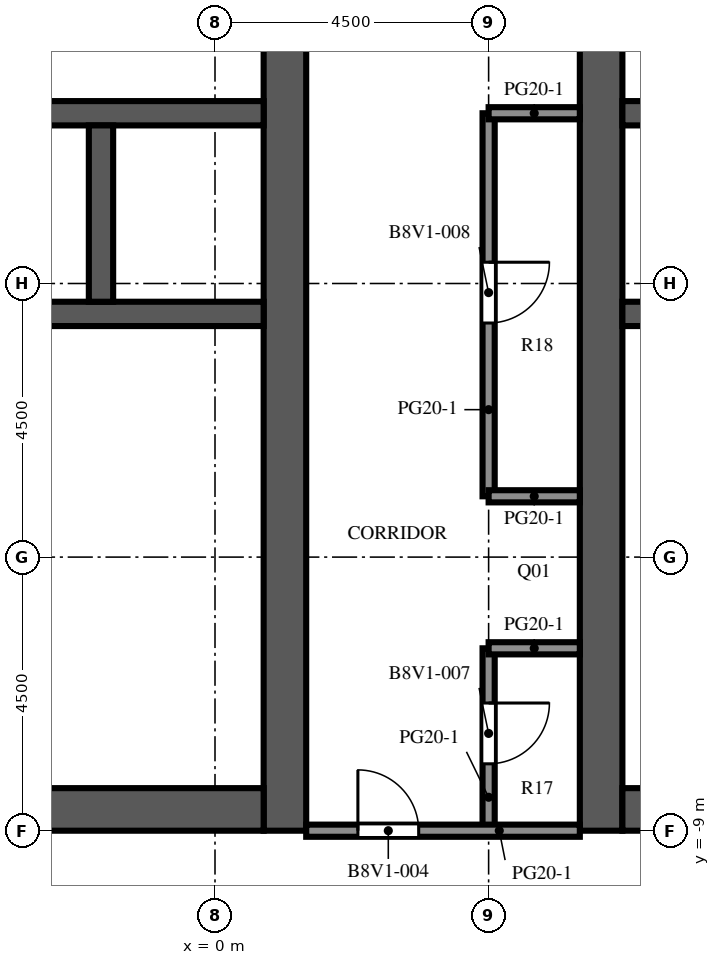
"""IFC4 building model, lengths in metres.
Left out: names, types, materials, properties, quantities, classifications, styles, units other than length and angle.
Written with IfcOpenShell. Run it as: python <this file> out.ifc"""

import sys

from ifc_helpers import new_model, si_unit, direction, frame, frame_2d, origin, place, context, subcontext, project, spatial, rectangle, extrude, element, fill, save


model = new_model("IFC4")
c1 = context("Model", 3, precision=1e-05, world=origin(), true_north=direction((0.0, 1.0)))
c2 = subcontext(c1, "Body", "Model", "MODEL_VIEW")
j1 = project(units=[si_unit("LENGTHUNIT", "METRE"), si_unit("PLANEANGLEUNIT", "RADIAN")], contexts=[c1])
p1 = place(None, origin())
s1 = spatial("IfcSite", under=j1, at=p1, CompositionType="ELEMENT")
p2 = place(p1, origin())
s2 = spatial("IfcBuilding", under=s1, at=p2, CompositionType="ELEMENT")
p3 = place(p2, frame((0.0, 0.0, 270.4)))
s3 = spatial("IfcBuildingStorey", under=s2, at=p3, CompositionType="ELEMENT", Elevation=270.4)
p4 = place(p3, frame((1.15, -9.0, 0.0), z_axis=(0.0, 0.0, 1.0), x_axis=(0.0, 1.0, 0.0)))
e1 = element("IfcWall", 1, at=p4, inside=s3, PredefinedType="SHEAR", context=c2, shape_type="SweptSolid", body=[
    extrude(rectangle(XDim=27.5, YDim=0.7, at=frame_2d((13.75, 0.0))), origin(), (0.0, 0.0, 1.0), 4.1),
])
p5 = place(p4, frame((12.55, 0.0, 0.0)))
e2 = element("IfcOpeningElement", 2, at=p5, cuts=e1, PredefinedType="OPENING", context=c2, shape_type="SweptSolid", body=[
    extrude(rectangle(XDim=2.4, YDim=2.4, at=frame_2d((1.2, 1.2))), frame((0.0, 0.36, 0.0), z_axis=(0.0, -1.0, 0.0), x_axis=(1.0, 0.0, 0.0)), (0.0, 0.0, 1.0), 0.72),
])
p6 = place(p4, frame((3.9, 0.0, 0.0)))
e3 = element("IfcOpeningElement", 3, at=p6, cuts=e1, PredefinedType="OPENING", context=c2, shape_type="SweptSolid", body=[
    extrude(rectangle(XDim=1.2, YDim=2.1, at=frame_2d((0.6, 1.05))), frame((0.0, 0.36, 0.0), z_axis=(0.0, -1.0, 0.0), x_axis=(1.0, 0.0, 0.0)), (0.0, 0.0, 1.0), 0.72),
])
p7 = place(p4, frame((19.46, 0.0, 0.0)))
e4 = element("IfcOpeningElement", 4, at=p7, cuts=e1, PredefinedType="OPENING", context=c2, shape_type="SweptSolid", body=[
    extrude(rectangle(XDim=1.0, YDim=2.1, at=frame_2d((0.5, 1.05))), frame((0.0, 0.36, 0.0), z_axis=(0.0, -1.0, 0.0), x_axis=(1.0, 0.0, 0.0)), (0.0, 0.0, 1.0), 0.72),
])
p8 = place(p4, frame((21.17, 0.0, 0.0)))
e5 = element("IfcOpeningElement", 5, at=p8, cuts=e1, PredefinedType="OPENING", context=c2, shape_type="SweptSolid", body=[
    extrude(rectangle(XDim=1.0, YDim=2.1, at=frame_2d((0.5, 1.05))), frame((0.0, 0.36, 0.0), z_axis=(0.0, -1.0, 0.0), x_axis=(1.0, 0.0, 0.0)), (0.0, 0.0, 1.0), 0.72),
])
p9 = place(p4, frame((23.26, 0.0, 0.0)))
e6 = element("IfcOpeningElement", 6, at=p9, cuts=e1, PredefinedType="OPENING", context=c2, shape_type="SweptSolid", body=[
    extrude(rectangle(XDim=1.0, YDim=2.1, at=frame_2d((0.5, 1.05))), frame((0.0, 0.36, 0.0), z_axis=(0.0, -1.0, 0.0), x_axis=(1.0, 0.0, 0.0)), (0.0, 0.0, 1.0), 0.72),
])
p10 = place(p4, frame((25.35, 0.0, 0.0)))
e7 = element("IfcOpeningElement", 7, at=p10, cuts=e1, PredefinedType="OPENING", context=c2, shape_type="SweptSolid", body=[
    extrude(rectangle(XDim=1.0, YDim=2.1, at=frame_2d((0.5, 1.05))), frame((0.0, 0.36, 0.0), z_axis=(0.0, -1.0, 0.0), x_axis=(1.0, 0.0, 0.0)), (0.0, 0.0, 1.0), 0.72),
])
p11 = place(p3, frame((-9.8, -8.65, 0.0), z_axis=(0.0, 0.0, 1.0), x_axis=(1.0, 0.0, 0.0)))
e8 = element("IfcWall", 8, at=p11, inside=s3, PredefinedType="SHEAR", context=c2, shape_type="SweptSolid", body=[
    extrude(rectangle(XDim=10.6, YDim=0.7, at=frame_2d((5.3, 0.0))), origin(), (0.0, 0.0, 1.0), 4.1),
])
p12 = place(p3, frame((-9.8, -0.5, 0.0), z_axis=(0.0, 0.0, 1.0), x_axis=(1.0, 0.0, 0.0)))
e9 = element("IfcWall", 9, at=p12, inside=s3, PredefinedType="SHEAR", context=c2, shape_type="SweptSolid", body=[
    extrude(rectangle(XDim=10.6, YDim=0.4, at=frame_2d((5.3, 0.0))), origin(), (0.0, 0.0, 1.0), 4.1),
])
p13 = place(p3, frame((-9.8, 2.8, 0.0), z_axis=(0.0, 0.0, 1.0), x_axis=(1.0, 0.0, 0.0)))
e10 = element("IfcWall", 10, at=p13, inside=s3, PredefinedType="SHEAR", context=c2, shape_type="SweptSolid", body=[
    extrude(rectangle(XDim=10.6, YDim=0.4, at=frame_2d((5.3, 0.0))), origin(), (0.0, 0.0, 1.0), 4.1),
])
p14 = place(p13, frame((0.688, 0.0, 0.0)))
e11 = element("IfcOpeningElement", 11, at=p14, cuts=e10, PredefinedType="OPENING", context=c2, shape_type="SweptSolid", body=[
    extrude(rectangle(XDim=1.1, YDim=2.1, at=frame_2d((0.55, 1.05))), frame((0.0, 0.21, 0.0), z_axis=(0.0, -1.0, 0.0), x_axis=(1.0, 0.0, 0.0)), (0.0, 0.0, 1.0), 0.42),
])
p15 = place(p13, frame((3.438, 0.0, 0.0)))
e12 = element("IfcOpeningElement", 12, at=p15, cuts=e10, PredefinedType="OPENING", context=c2, shape_type="SweptSolid", body=[
    extrude(rectangle(XDim=1.1, YDim=2.1, at=frame_2d((0.55, 1.05))), frame((0.0, 0.21, 0.0), z_axis=(0.0, -1.0, 0.0), x_axis=(1.0, 0.0, 0.0)), (0.0, 0.0, 1.0), 0.42),
])
p16 = place(p13, frame((6.113, 0.0, 0.0)))
e13 = element("IfcOpeningElement", 13, at=p16, cuts=e10, PredefinedType="OPENING", context=c2, shape_type="SweptSolid", body=[
    extrude(rectangle(XDim=1.0, YDim=2.1, at=frame_2d((0.5, 1.05))), frame((0.0, 0.21, 0.0), z_axis=(0.0, -1.0, 0.0), x_axis=(1.0, 0.0, 0.0)), (0.0, 0.0, 1.0), 0.42),
])
p17 = place(p13, frame((8.863, 0.0, 0.0)))
e14 = element("IfcOpeningElement", 14, at=p17, cuts=e10, PredefinedType="OPENING", context=c2, shape_type="SweptSolid", body=[
    extrude(rectangle(XDim=1.0, YDim=2.1, at=frame_2d((0.5, 1.05))), frame((0.0, 0.21, 0.0), z_axis=(0.0, -1.0, 0.0), x_axis=(1.0, 0.0, 0.0)), (0.0, 0.0, 1.0), 0.42),
])
p18 = place(p3, frame((-1.875, -0.3, 0.0), z_axis=(0.0, 0.0, 1.0), x_axis=(0.0, 1.0, 0.0)))
e15 = element("IfcWall", 15, at=p18, inside=s3, PredefinedType="SHEAR", context=c2, shape_type="SweptSolid", body=[
    extrude(rectangle(XDim=2.9, YDim=0.4, at=frame_2d((1.45, 0.0))), origin(), (0.0, 0.0, 1.0), 4.1),
])
p19 = place(p3, frame((6.35, -9.0, 0.0), z_axis=(0.0, 0.0, 1.0), x_axis=(0.0, 1.0, 0.0)))
e16 = element("IfcWall", 16, at=p19, inside=s3, PredefinedType="SHEAR", context=c2, shape_type="SweptSolid", body=[
    extrude(rectangle(XDim=27.5, YDim=0.7, at=frame_2d((13.75, 0.0))), origin(), (0.0, 0.0, 1.0), 4.1),
])
p20 = place(p19, frame((12.55, 0.0, 0.0)))
e17 = element("IfcOpeningElement", 17, at=p20, cuts=e16, PredefinedType="OPENING", context=c2, shape_type="SweptSolid", body=[
    extrude(rectangle(XDim=2.4, YDim=2.4, at=frame_2d((1.2, 1.2))), frame((0.0, 0.36, 0.0), z_axis=(0.0, -1.0, 0.0), x_axis=(1.0, 0.0, 0.0)), (0.0, 0.0, 1.0), 0.72),
])
p21 = place(p19, frame((3.9, 0.0, 0.0)))
e18 = element("IfcOpeningElement", 18, at=p21, cuts=e16, PredefinedType="OPENING", context=c2, shape_type="SweptSolid", body=[
    extrude(rectangle(XDim=1.2, YDim=2.1, at=frame_2d((0.6, 1.05))), frame((0.0, 0.36, 0.0), z_axis=(0.0, -1.0, 0.0), x_axis=(1.0, 0.0, 0.0)), (0.0, 0.0, 1.0), 0.72),
])
p22 = place(p19, frame((19.46, 0.0, 0.0)))
e19 = element("IfcOpeningElement", 19, at=p22, cuts=e16, PredefinedType="OPENING", context=c2, shape_type="SweptSolid", body=[
    extrude(rectangle(XDim=1.0, YDim=2.1, at=frame_2d((0.5, 1.05))), frame((0.0, 0.36, 0.0), z_axis=(0.0, -1.0, 0.0), x_axis=(1.0, 0.0, 0.0)), (0.0, 0.0, 1.0), 0.72),
])
p23 = place(p19, frame((21.17, 0.0, 0.0)))
e20 = element("IfcOpeningElement", 20, at=p23, cuts=e16, PredefinedType="OPENING", context=c2, shape_type="SweptSolid", body=[
    extrude(rectangle(XDim=1.0, YDim=2.1, at=frame_2d((0.5, 1.05))), frame((0.0, 0.36, 0.0), z_axis=(0.0, -1.0, 0.0), x_axis=(1.0, 0.0, 0.0)), (0.0, 0.0, 1.0), 0.72),
])
p24 = place(p19, frame((23.26, 0.0, 0.0)))
e21 = element("IfcOpeningElement", 21, at=p24, cuts=e16, PredefinedType="OPENING", context=c2, shape_type="SweptSolid", body=[
    extrude(rectangle(XDim=1.0, YDim=2.1, at=frame_2d((0.5, 1.05))), frame((0.0, 0.36, 0.0), z_axis=(0.0, -1.0, 0.0), x_axis=(1.0, 0.0, 0.0)), (0.0, 0.0, 1.0), 0.72),
])
p25 = place(p19, frame((25.35, 0.0, 0.0)))
e22 = element("IfcOpeningElement", 22, at=p25, cuts=e16, PredefinedType="OPENING", context=c2, shape_type="SweptSolid", body=[
    extrude(rectangle(XDim=1.0, YDim=2.1, at=frame_2d((0.5, 1.05))), frame((0.0, 0.36, 0.0), z_axis=(0.0, -1.0, 0.0), x_axis=(1.0, 0.0, 0.0)), (0.0, 0.0, 1.0), 0.72),
])
p26 = place(p3, frame((6.7, -8.65, 0.0), z_axis=(0.0, 0.0, 1.0), x_axis=(1.0, 0.0, 0.0)))
e23 = element("IfcWall", 23, at=p26, inside=s3, PredefinedType="SHEAR", context=c2, shape_type="SweptSolid", body=[
    extrude(rectangle(XDim=10.6, YDim=0.7, at=frame_2d((5.3, 0.0))), origin(), (0.0, 0.0, 1.0), 4.1),
])
p27 = place(p3, frame((6.7, -0.5, 0.0), z_axis=(0.0, 0.0, 1.0), x_axis=(1.0, 0.0, 0.0)))
e24 = element("IfcWall", 24, at=p27, inside=s3, PredefinedType="SHEAR", context=c2, shape_type="SweptSolid", body=[
    extrude(rectangle(XDim=10.6, YDim=0.4, at=frame_2d((5.3, 0.0))), origin(), (0.0, 0.0, 1.0), 4.1),
])
p28 = place(p3, frame((6.7, 2.8, 0.0), z_axis=(0.0, 0.0, 1.0), x_axis=(1.0, 0.0, 0.0)))
e25 = element("IfcWall", 25, at=p28, inside=s3, PredefinedType="SHEAR", context=c2, shape_type="SweptSolid", body=[
    extrude(rectangle(XDim=10.6, YDim=0.4, at=frame_2d((5.3, 0.0))), origin(), (0.0, 0.0, 1.0), 4.1),
])
p29 = place(p28, frame((0.688, 0.0, 0.0)))
e26 = element("IfcOpeningElement", 26, at=p29, cuts=e25, PredefinedType="OPENING", context=c2, shape_type="SweptSolid", body=[
    extrude(rectangle(XDim=1.1, YDim=2.1, at=frame_2d((0.55, 1.05))), frame((0.0, 0.21, 0.0), z_axis=(0.0, -1.0, 0.0), x_axis=(1.0, 0.0, 0.0)), (0.0, 0.0, 1.0), 0.42),
])
p30 = place(p28, frame((3.438, 0.0, 0.0)))
e27 = element("IfcOpeningElement", 27, at=p30, cuts=e25, PredefinedType="OPENING", context=c2, shape_type="SweptSolid", body=[
    extrude(rectangle(XDim=1.1, YDim=2.1, at=frame_2d((0.55, 1.05))), frame((0.0, 0.21, 0.0), z_axis=(0.0, -1.0, 0.0), x_axis=(1.0, 0.0, 0.0)), (0.0, 0.0, 1.0), 0.42),
])
p31 = place(p28, frame((6.113, 0.0, 0.0)))
e28 = element("IfcOpeningElement", 28, at=p31, cuts=e25, PredefinedType="OPENING", context=c2, shape_type="SweptSolid", body=[
    extrude(rectangle(XDim=1.0, YDim=2.1, at=frame_2d((0.5, 1.05))), frame((0.0, 0.21, 0.0), z_axis=(0.0, -1.0, 0.0), x_axis=(1.0, 0.0, 0.0)), (0.0, 0.0, 1.0), 0.42),
])
p32 = place(p28, frame((8.863, 0.0, 0.0)))
e29 = element("IfcOpeningElement", 29, at=p32, cuts=e25, PredefinedType="OPENING", context=c2, shape_type="SweptSolid", body=[
    extrude(rectangle(XDim=1.0, YDim=2.1, at=frame_2d((0.5, 1.05))), frame((0.0, 0.21, 0.0), z_axis=(0.0, -1.0, 0.0), x_axis=(1.0, 0.0, 0.0)), (0.0, 0.0, 1.0), 0.42),
])
p33 = place(p3, frame((-0.8, -6.02, 0.0), z_axis=(0.0, 0.0, 1.0), x_axis=(1.0, 0.0, 0.0)))
e30 = element("IfcWall", 30, at=p33, inside=s3, PredefinedType="PARTITIONING", context=c2, shape_type="SweptSolid", body=[
    extrude(rectangle(XDim=1.6, YDim=0.1, at=frame_2d((0.8, 0.0))), origin(), (0.0, 0.0, 1.0), 3.65),
])
p34 = place(p33, frame((0.3, 0.0, 0.0)))
e31 = element("IfcOpeningElement", 31, at=p34, cuts=e30, PredefinedType="OPENING", context=c2, shape_type="SweptSolid", body=[
    extrude(rectangle(XDim=1.0, YDim=2.1, at=frame_2d((0.5, 1.05))), frame((0.0, 0.06, 0.0), z_axis=(0.0, -1.0, 0.0), x_axis=(1.0, 0.0, 0.0)), (0.0, 0.0, 1.0), 0.12),
])
p35 = place(p3, frame((-0.8, -2.98, 0.0), z_axis=(0.0, 0.0, 1.0), x_axis=(1.0, 0.0, 0.0)))
e32 = element("IfcWall", 32, at=p35, inside=s3, PredefinedType="PARTITIONING", context=c2, shape_type="SweptSolid", body=[
    extrude(rectangle(XDim=1.6, YDim=0.1, at=frame_2d((0.8, 0.0))), origin(), (0.0, 0.0, 1.0), 3.65),
])
p36 = place(p35, frame((0.3, 0.0, 0.0)))
e33 = element("IfcOpeningElement", 33, at=p36, cuts=e32, PredefinedType="OPENING", context=c2, shape_type="SweptSolid", body=[
    extrude(rectangle(XDim=1.0, YDim=2.1, at=frame_2d((0.5, 1.05))), frame((0.0, 0.06, 0.0), z_axis=(0.0, -1.0, 0.0), x_axis=(1.0, 0.0, 0.0)), (0.0, 0.0, 1.0), 0.12),
])
p37 = place(p3, frame((-0.8, -6.02, 0.0), z_axis=(0.0, 0.0, 1.0), x_axis=(0.0, 1.0, 0.0)))
e34 = element("IfcWall", 34, at=p37, inside=s3, PredefinedType="PARTITIONING", context=c2, shape_type="SweptSolid", body=[
    extrude(rectangle(XDim=3.04, YDim=0.1, at=frame_2d((1.52, 0.0))), origin(), (0.0, 0.0, 1.0), 3.65),
])
p38 = place(p37, frame((1.02, 0.0, 0.0)))
e35 = element("IfcOpeningElement", 35, at=p38, cuts=e34, PredefinedType="OPENING", context=c2, shape_type="SweptSolid", body=[
    extrude(rectangle(XDim=1.0, YDim=2.1, at=frame_2d((0.5, 1.05))), frame((0.0, 0.06, 0.0), z_axis=(0.0, -1.0, 0.0), x_axis=(1.0, 0.0, 0.0)), (0.0, 0.0, 1.0), 0.12),
])
for number, where, z_axis, x_axis in (
    (36, (-4.3, -6.02, 0.0), (0.0, 0.0, 1.0), (1.0, 0.0, 0.0)),
    (37, (-4.3, -2.98, 0.0), (0.0, 0.0, 1.0), (1.0, 0.0, 0.0)),
):
    element("IfcWall", number, at=place(p3, frame(where, z_axis=z_axis, x_axis=x_axis)), inside=s3, PredefinedType="PARTITIONING", context=c2, shape_type="SweptSolid", body=[
        extrude(rectangle(XDim=3.5, YDim=0.1, at=frame_2d((1.75, 0.0))), origin(), (0.0, 0.0, 1.0), 3.65),
    ])
p39 = place(p3, frame((6.7, -6.02, 0.0), z_axis=(0.0, 0.0, 1.0), x_axis=(1.0, 0.0, 0.0)))
e38 = element("IfcWall", 38, at=p39, inside=s3, PredefinedType="PARTITIONING", context=c2, shape_type="SweptSolid", body=[
    extrude(rectangle(XDim=1.6, YDim=0.1, at=frame_2d((0.8, 0.0))), origin(), (0.0, 0.0, 1.0), 3.65),
])
p40 = place(p39, frame((0.3, 0.0, 0.0)))
e39 = element("IfcOpeningElement", 39, at=p40, cuts=e38, PredefinedType="OPENING", context=c2, shape_type="SweptSolid", body=[
    extrude(rectangle(XDim=1.0, YDim=2.1, at=frame_2d((0.5, 1.05))), frame((0.0, 0.06, 0.0), z_axis=(0.0, -1.0, 0.0), x_axis=(1.0, 0.0, 0.0)), (0.0, 0.0, 1.0), 0.12),
])
p41 = place(p3, frame((6.7, -2.98, 0.0), z_axis=(0.0, 0.0, 1.0), x_axis=(1.0, 0.0, 0.0)))
e40 = element("IfcWall", 40, at=p41, inside=s3, PredefinedType="PARTITIONING", context=c2, shape_type="SweptSolid", body=[
    extrude(rectangle(XDim=1.6, YDim=0.1, at=frame_2d((0.8, 0.0))), origin(), (0.0, 0.0, 1.0), 3.65),
])
p42 = place(p41, frame((0.3, 0.0, 0.0)))
e41 = element("IfcOpeningElement", 41, at=p42, cuts=e40, PredefinedType="OPENING", context=c2, shape_type="SweptSolid", body=[
    extrude(rectangle(XDim=1.0, YDim=2.1, at=frame_2d((0.5, 1.05))), frame((0.0, 0.06, 0.0), z_axis=(0.0, -1.0, 0.0), x_axis=(1.0, 0.0, 0.0)), (0.0, 0.0, 1.0), 0.12),
])
p43 = place(p3, frame((4.5, -6.0, 0.0), z_axis=(0.0, 0.0, 1.0), x_axis=(0.0, -1.0, 0.0)))
e42 = element("IfcWall", 42, at=p43, inside=s3, PredefinedType="PARTITIONING", context=c2, shape_type="SweptSolid", body=[
    extrude(rectangle(XDim=3.0, YDim=0.2, at=frame_2d((1.5, 0.0))), origin(), (0.0, 0.0, 1.0), 3.65),
])
p44 = place(p43, frame((0.9, 0.0, 0.0)))
e43 = element("IfcOpeningElement", 43, at=p44, cuts=e42, PredefinedType="OPENING", context=c2, shape_type="SweptSolid", body=[
    extrude(rectangle(XDim=1.0, YDim=2.1, at=frame_2d((0.5, 1.05))), frame((0.0, 0.11, 0.0), z_axis=(0.0, -1.0, 0.0), x_axis=(1.0, 0.0, 0.0)), (0.0, 0.0, 1.0), 0.22),
])
p45 = place(p3, frame((4.5, 2.8, 0.0), z_axis=(0.0, 0.0, 1.0), x_axis=(0.0, -1.0, 0.0)))
e44 = element("IfcWall", 44, at=p45, inside=s3, PredefinedType="PARTITIONING", context=c2, shape_type="SweptSolid", body=[
    extrude(rectangle(XDim=6.3, YDim=0.2, at=frame_2d((3.15, 0.0))), origin(), (0.0, 0.0, 1.0), 3.65),
])
p46 = place(p45, frame((2.45, 0.0, 0.0)))
e45 = element("IfcOpeningElement", 45, at=p46, cuts=e44, PredefinedType="OPENING", context=c2, shape_type="SweptSolid", body=[
    extrude(rectangle(XDim=1.0, YDim=2.1, at=frame_2d((0.5, 1.05))), frame((0.0, 0.11, 0.0), z_axis=(0.0, -1.0, 0.0), x_axis=(1.0, 0.0, 0.0)), (0.0, 0.0, 1.0), 0.22),
])
p47 = place(p3, frame((6.0, -9.0, 0.0), z_axis=(0.0, 0.0, 1.0), x_axis=(-1.0, 0.0, 0.0)))
e46 = element("IfcWall", 46, at=p47, inside=s3, PredefinedType="PARTITIONING", context=c2, shape_type="SweptSolid", body=[
    extrude(rectangle(XDim=4.5, YDim=0.2, at=frame_2d((2.25, 0.0))), origin(), (0.0, 0.0, 1.0), 3.65),
])
p48 = place(p47, frame((2.65, 0.0, 0.0)))
e47 = element("IfcOpeningElement", 47, at=p48, cuts=e46, PredefinedType="OPENING", context=c2, shape_type="SweptSolid", body=[
    extrude(rectangle(XDim=1.0, YDim=2.1, at=frame_2d((0.5, 1.05))), frame((0.0, 0.11, 0.0), z_axis=(0.0, -1.0, 0.0), x_axis=(1.0, 0.0, 0.0)), (0.0, 0.0, 1.0), 0.22),
])
for number, where, z_axis, x_axis in (
    (48, (4.5, -6.0, 0.0), (0.0, 0.0, 1.0), (1.0, 0.0, 0.0)),
    (49, (4.5, -3.5, 0.0), (0.0, 0.0, 1.0), (1.0, 0.0, 0.0)),
    (50, (4.5, 2.8, 0.0), (0.0, 0.0, 1.0), (1.0, 0.0, 0.0)),
):
    element("IfcWall", number, at=place(p3, frame(where, z_axis=z_axis, x_axis=x_axis)), inside=s3, PredefinedType="PARTITIONING", context=c2, shape_type="SweptSolid", body=[
        extrude(rectangle(XDim=1.5, YDim=0.2, at=frame_2d((0.75, 0.0))), origin(), (0.0, 0.0, 1.0), 3.65),
    ])
p49 = place(p5, origin())
e51 = element("IfcDoor", 51, at=p49, inside=s3, OperationType="DOUBLE_DOOR_DOUBLE_SWING", PredefinedType="DOOR", context=c2, shape_type="SweptSolid", body=[
    extrude(rectangle(XDim=2.4, YDim=2.4, at=frame_2d((1.2, 1.2))), frame((0.0, 0.025, 0.0), z_axis=(0.0, -1.0, 0.0), x_axis=(1.0, 0.0, 0.0)), (0.0, 0.0, 1.0), 0.05),
])
fill(e2, e51)
p50 = place(p20, origin())
e52 = element("IfcDoor", 52, at=p50, inside=s3, OperationType="DOUBLE_DOOR_DOUBLE_SWING", PredefinedType="DOOR", context=c2, shape_type="SweptSolid", body=[
    extrude(rectangle(XDim=2.4, YDim=2.4, at=frame_2d((1.2, 1.2))), frame((0.0, 0.025, 0.0), z_axis=(0.0, -1.0, 0.0), x_axis=(1.0, 0.0, 0.0)), (0.0, 0.0, 1.0), 0.05),
])
fill(e17, e52)
p51 = place(p17, origin())
e53 = element("IfcDoor", 53, at=p51, inside=s3, OperationType="SINGLE_SWING_RIGHT", PredefinedType="DOOR", context=c2, shape_type="SweptSolid", body=[
    extrude(rectangle(XDim=1.0, YDim=2.1, at=frame_2d((0.5, 1.05))), frame((0.0, 0.025, 0.0), z_axis=(0.0, -1.0, 0.0), x_axis=(1.0, 0.0, 0.0)), (0.0, 0.0, 1.0), 0.05),
])
fill(e14, e53)
p52 = place(p6, origin())
e54 = element("IfcDoor", 54, at=p52, inside=s3, OperationType="SINGLE_SWING_LEFT", PredefinedType="DOOR", context=c2, shape_type="SweptSolid", body=[
    extrude(rectangle(XDim=1.2, YDim=2.1, at=frame_2d((0.6, 1.05))), frame((0.0, 0.325, 0.0), z_axis=(0.0, -1.0, 0.0), x_axis=(1.0, 0.0, 0.0)), (0.0, 0.0, 1.0), 0.05),
])
fill(e3, e54)
p53 = place(p34, origin())
e55 = element("IfcDoor", 55, at=p53, inside=s3, OperationType="SINGLE_SWING_RIGHT", PredefinedType="DOOR", context=c2, shape_type="SweptSolid", body=[
    extrude(rectangle(XDim=1.0, YDim=2.1, at=frame_2d((0.5, 1.05))), frame((0.0, 0.025, 0.0), z_axis=(0.0, -1.0, 0.0), x_axis=(1.0, 0.0, 0.0)), (0.0, 0.0, 1.0), 0.05),
])
fill(e31, e55)
p54 = place(p36, origin())
e56 = element("IfcDoor", 56, at=p54, inside=s3, OperationType="SINGLE_SWING_LEFT", PredefinedType="DOOR", context=c2, shape_type="SweptSolid", body=[
    extrude(rectangle(XDim=1.0, YDim=2.1, at=frame_2d((0.5, 1.05))), frame((0.0, 0.025, 0.0), z_axis=(0.0, -1.0, 0.0), x_axis=(1.0, 0.0, 0.0)), (0.0, 0.0, 1.0), 0.05),
])
fill(e33, e56)
p55 = place(p38, origin())
e57 = element("IfcDoor", 57, at=p55, inside=s3, OperationType="SINGLE_SWING_RIGHT", PredefinedType="DOOR", context=c2, shape_type="SweptSolid", body=[
    extrude(rectangle(XDim=1.0, YDim=2.1, at=frame_2d((0.5, 1.05))), frame((0.0, 0.025, 0.0), z_axis=(0.0, -1.0, 0.0), x_axis=(1.0, 0.0, 0.0)), (0.0, 0.0, 1.0), 0.05),
])
fill(e35, e57)
p56 = place(p21, origin())
e58 = element("IfcDoor", 58, at=p56, inside=s3, OperationType="SINGLE_SWING_RIGHT", PredefinedType="DOOR", context=c2, shape_type="SweptSolid", body=[
    extrude(rectangle(XDim=1.2, YDim=2.1, at=frame_2d((0.6, 1.05))), frame((0.0, -0.275, 0.0), z_axis=(0.0, -1.0, 0.0), x_axis=(1.0, 0.0, 0.0)), (0.0, 0.0, 1.0), 0.05),
])
fill(e18, e58)
p57 = place(p48, origin())
e59 = element("IfcDoor", 59, at=p57, inside=s3, OperationType="SINGLE_SWING_RIGHT", PredefinedType="DOOR", context=c2, shape_type="SweptSolid", body=[
    extrude(rectangle(XDim=1.0, YDim=2.1, at=frame_2d((0.5, 1.05))), frame((0.0, 0.025, 0.0), z_axis=(0.0, -1.0, 0.0), x_axis=(1.0, 0.0, 0.0)), (0.0, 0.0, 1.0), 0.05),
])
fill(e47, e59)
p58 = place(p44, origin())
e60 = element("IfcDoor", 60, at=p58, inside=s3, OperationType="SINGLE_SWING_LEFT", PredefinedType="DOOR", context=c2, shape_type="SweptSolid", body=[
    extrude(rectangle(XDim=1.0, YDim=2.1, at=frame_2d((0.5, 1.05))), frame((0.0, 0.025, 0.0), z_axis=(0.0, -1.0, 0.0), x_axis=(1.0, 0.0, 0.0)), (0.0, 0.0, 1.0), 0.05),
])
fill(e43, e60)
p59 = place(p46, origin())
e61 = element("IfcDoor", 61, at=p59, inside=s3, OperationType="SINGLE_SWING_LEFT", PredefinedType="DOOR", context=c2, shape_type="SweptSolid", body=[
    extrude(rectangle(XDim=1.0, YDim=2.1, at=frame_2d((0.5, 1.05))), frame((0.0, 0.025, 0.0), z_axis=(0.0, -1.0, 0.0), x_axis=(1.0, 0.0, 0.0)), (0.0, 0.0, 1.0), 0.05),
])
fill(e45, e61)
save(model, sys.argv[1])
